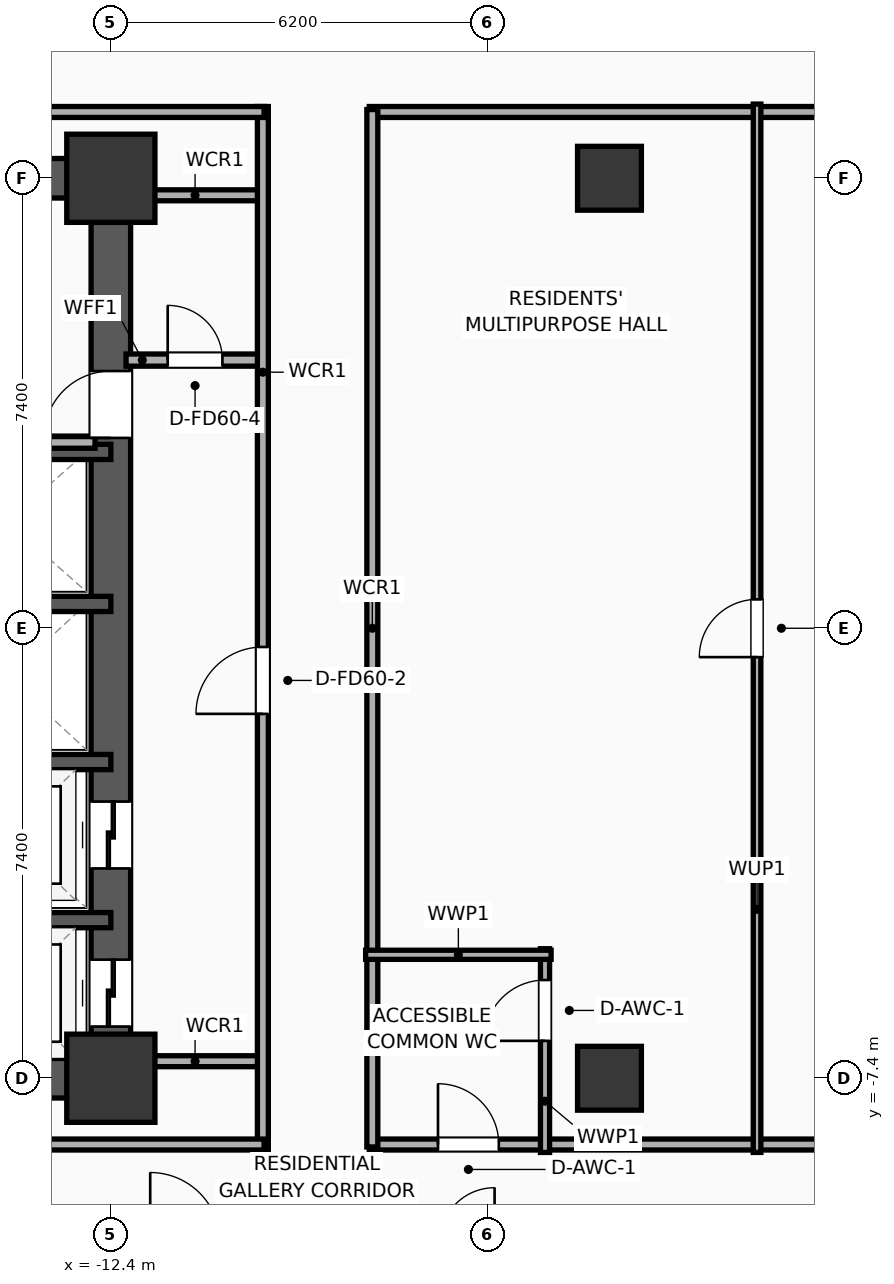
"""IFC4 building model, lengths in metres.
Left out: names, types, materials, properties, quantities, classifications, styles, units other than length and angle.
Written with IfcOpenShell. Run it as: python <this file> out.ifc"""

import sys

from ifc_helpers import new_model, si_unit, direction, frame, frame_2d, origin, origin_2d, place, context, subcontext, project, spatial, rectangle, extrude, element, fill, save


model = new_model("IFC4")
c1 = context("Model", 3, precision=1e-05, world=origin(), true_north=direction((0.0, 1.0)))
c2 = subcontext(c1, "Body", "Model", "MODEL_VIEW")
j1 = project(units=[si_unit("LENGTHUNIT", "METRE"), si_unit("PLANEANGLEUNIT", "RADIAN")], contexts=[c1])
p1 = place(None, origin())
s1 = spatial("IfcSite", under=j1, at=p1, CompositionType="ELEMENT")
p2 = place(p1, origin())
s2 = spatial("IfcBuilding", under=s1, at=p2, CompositionType="ELEMENT")
p3 = place(p2, frame((0.0, 0.0, 33.8)))
s3 = spatial("IfcBuildingStorey", under=s2, at=p3, CompositionType="ELEMENT", Elevation=33.8)
for number, where, z_axis, x_axis in (
    (1, (-12.4, -7.4, 0.0), (0.0, 0.0, 1.0), (1.0, 0.0, 0.0)),
    (2, (-12.4, 7.4, 0.0), (0.0, 0.0, 1.0), (1.0, 0.0, 0.0)),
):
    element("IfcColumn", number, at=place(p3, frame(where, z_axis=z_axis, x_axis=x_axis)), inside=s3, PredefinedType="COLUMN", context=c2, shape_type="SweptSolid", body=[
        extrude(rectangle(XDim=1.45, YDim=1.45, at=origin_2d()), origin(), (0.0, 0.0, 1.0), 3.9),
    ])
for number, where, z_axis, x_axis in (
    (3, (-19.525, -7.4, 0.0), (0.0, 0.0, 1.0), (1.0, 0.0, 0.0)),
    (4, (-19.525, 7.4, 0.0), (0.0, 0.0, 1.0), (1.0, 0.0, 0.0)),
):
    element("IfcWall", number, at=place(p3, frame(where, z_axis=z_axis, x_axis=x_axis)), inside=s3, PredefinedType="SHEAR", context=c2, shape_type="SweptSolid", body=[
        extrude(rectangle(XDim=7.45, YDim=0.65, at=frame_2d((3.725, 0.0))), origin(), (0.0, 0.0, 1.0), 3.65),
    ])
p4 = place(p3, frame((-12.4, -7.4, 0.0), z_axis=(0.0, 0.0, 1.0), x_axis=(0.0, 1.0, 0.0)))
e5 = element("IfcWall", 5, at=p4, inside=s3, PredefinedType="SHEAR", context=c2, shape_type="SweptSolid", body=[
    extrude(rectangle(XDim=14.8, YDim=0.65, at=frame_2d((7.4, 0.0))), origin(), (0.0, 0.0, 1.0), 3.65),
])
p5 = place(p4, frame((0.85, 0.0, 0.0)))
e6 = element("IfcOpeningElement", 6, at=p5, cuts=e5, PredefinedType="OPENING", context=c2, shape_type="SweptSolid", body=[
    extrude(rectangle(XDim=1.1, YDim=2.05, at=frame_2d((0.55, 1.025))), frame((0.0, 0.335, 0.0), z_axis=(0.0, -1.0, 0.0), x_axis=(1.0, 0.0, 0.0)), (0.0, 0.0, 1.0), 0.67),
])
p6 = place(p4, frame((3.45, 0.0, 0.0)))
e7 = element("IfcOpeningElement", 7, at=p6, cuts=e5, PredefinedType="OPENING", context=c2, shape_type="SweptSolid", body=[
    extrude(rectangle(XDim=1.1, YDim=2.05, at=frame_2d((0.55, 1.025))), frame((0.0, 0.335, 0.0), z_axis=(0.0, -1.0, 0.0), x_axis=(1.0, 0.0, 0.0)), (0.0, 0.0, 1.0), 0.67),
])
p7 = place(p4, frame((10.53, 0.0, 0.0)))
e8 = element("IfcOpeningElement", 8, at=p7, cuts=e5, PredefinedType="OPENING", context=c2, shape_type="SweptSolid", body=[
    extrude(rectangle(XDim=1.1, YDim=2.05, at=frame_2d((0.55, 1.025))), frame((0.0, 0.335, 0.0), z_axis=(0.0, -1.0, 0.0), x_axis=(1.0, 0.0, 0.0)), (0.0, 0.0, 1.0), 0.67),
])
for number, where, z_axis, x_axis in (
    (9, (-4.2, -7.4, 0.0), (0.0, 0.0, 1.0), (1.0, 0.0, 0.0)),
    (10, (-4.2, 7.4, 0.0), (0.0, 0.0, 1.0), (1.0, 0.0, 0.0)),
):
    element("IfcColumn", number, at=place(p3, frame(where, z_axis=z_axis, x_axis=x_axis)), inside=s3, PredefinedType="COLUMN", context=c2, shape_type="SweptSolid", body=[
        extrude(rectangle(XDim=1.05, YDim=1.05, at=origin_2d()), origin(), (0.0, 0.0, 1.0), 3.9),
    ])
for number, where, z_axis, x_axis in (
    (11, (-12.4, -4.8, 0.0), (0.0, 0.0, 1.0), (-1.0, 0.0, 0.0)),
    (12, (-12.4, -2.2, 0.0), (0.0, 0.0, 1.0), (-1.0, 0.0, 0.0)),
    (13, (-12.4, 0.4, 0.0), (0.0, 0.0, 1.0), (-1.0, 0.0, 0.0)),
    (14, (-12.4, 2.9, 0.0), (0.0, 0.0, 1.0), (-1.0, 0.0, 0.0)),
):
    element("IfcWall", number, at=place(p3, frame(where, z_axis=z_axis, x_axis=x_axis)), inside=s3, PredefinedType="SOLIDWALL", context=c2, shape_type="SweptSolid", body=[
        extrude(rectangle(XDim=3.0, YDim=0.25, at=frame_2d((1.5, 0.0))), origin(), (0.0, 0.0, 1.0), 3.65),
    ])
p8 = place(p3, frame((-15.82, 3.06, 0.0), z_axis=(0.0, 0.0, 1.0), x_axis=(1.0, 0.0, 0.0)))
e15 = element("IfcWall", 15, at=p8, inside=s3, PredefinedType="PARTITIONING", context=c2, shape_type="SweptSolid", body=[
    extrude(rectangle(XDim=3.16, YDim=0.2, at=frame_2d((1.58, 0.0))), origin(), (0.0, 0.0, 1.0), 3.65),
])
p9 = place(p3, frame((-12.15, 4.41, 0.0), z_axis=(0.0, 0.0, 1.0), x_axis=(1.0, 0.0, 0.0)))
e16 = element("IfcWall", 16, at=p9, inside=s3, PredefinedType="PARTITIONING", context=c2, shape_type="SweptSolid", body=[
    extrude(rectangle(XDim=2.27, YDim=0.2, at=frame_2d((1.135, 0.0))), origin(), (0.0, 0.0, 1.0), 3.65),
])
p10 = place(p9, frame((0.685, 0.0, 0.0)))
e17 = element("IfcOpeningElement", 17, at=p10, cuts=e16, PredefinedType="OPENING", context=c2, shape_type="SweptSolid", body=[
    extrude(rectangle(XDim=0.9, YDim=2.05, at=frame_2d((0.45, 1.025))), frame((0.0, 0.11, 0.0), z_axis=(0.0, -1.0, 0.0), x_axis=(1.0, 0.0, 0.0)), (0.0, 0.0, 1.0), 0.22),
])
for number, where, z_axis, x_axis in (
    (18, (-12.15, 7.12, 0.0), (0.0, 0.0, 1.0), (1.0, 0.0, 0.0)),
    (19, (-12.15, -7.12, 0.0), (0.0, 0.0, 1.0), (1.0, 0.0, 0.0)),
):
    element("IfcWall", number, at=place(p3, frame(where, z_axis=z_axis, x_axis=x_axis)), inside=s3, PredefinedType="PARTITIONING", context=c2, shape_type="SweptSolid", body=[
        extrude(rectangle(XDim=2.27, YDim=0.18, at=frame_2d((1.135, 0.0))), origin(), (0.0, 0.0, 1.0), 2.94),
    ])
p11 = place(p3, frame((-9.9, -8.58, 0.0), z_axis=(0.0, 0.0, 1.0), x_axis=(0.0, 1.0, 0.0)))
e20 = element("IfcWall", 20, at=p11, inside=s3, PredefinedType="PARTITIONING", context=c2, shape_type="SweptSolid", body=[
    extrude(rectangle(XDim=17.16, YDim=0.18, at=frame_2d((8.58, 0.0))), origin(), (0.0, 0.0, 1.0), 3.65),
])
p12 = place(p11, frame((7.172, 0.0, 0.0)))
e21 = element("IfcOpeningElement", 21, at=p12, cuts=e20, PredefinedType="OPENING", context=c2, shape_type="SweptSolid", body=[
    extrude(rectangle(XDim=1.1, YDim=2.05, at=frame_2d((0.55, 1.025))), frame((0.0, 0.1, 0.0), z_axis=(0.0, -1.0, 0.0), x_axis=(1.0, 0.0, 0.0)), (0.0, 0.0, 1.0), 0.2),
])
p13 = place(p3, frame((-33.41, 8.49, 0.0), z_axis=(0.0, 0.0, 1.0), x_axis=(1.0, 0.0, 0.0)))
e22 = element("IfcWall", 22, at=p13, inside=s3, PredefinedType="PARTITIONING", context=c2, shape_type="SweptSolid", body=[
    extrude(rectangle(XDim=23.53, YDim=0.18, at=frame_2d((11.765, 0.0))), origin(), (0.0, 0.0, 1.0), 3.65),
])
p14 = place(p13, frame((4.54, 0.0, 0.0)))
e23 = element("IfcOpeningElement", 23, at=p14, cuts=e22, PredefinedType="OPENING", context=c2, shape_type="SweptSolid", body=[
    extrude(rectangle(XDim=1.15, YDim=2.05, at=frame_2d((0.575, 1.025))), frame((0.0, 0.1, 0.0), z_axis=(0.0, -1.0, 0.0), x_axis=(1.0, 0.0, 0.0)), (0.0, 0.0, 1.0), 0.2),
])
p15 = place(p3, frame((-33.41, -8.49, 0.0), z_axis=(0.0, 0.0, 1.0), x_axis=(1.0, 0.0, 0.0)))
e24 = element("IfcWall", 24, at=p15, inside=s3, PredefinedType="PARTITIONING", context=c2, shape_type="SweptSolid", body=[
    extrude(rectangle(XDim=23.53, YDim=0.18, at=frame_2d((11.765, 0.0))), origin(), (0.0, 0.0, 1.0), 3.65),
])
p16 = place(p3, frame((-8.15, 8.49, 0.0), z_axis=(0.0, 0.0, 1.0), x_axis=(1.0, 0.0, 0.0)))
e25 = element("IfcWall", 25, at=p16, inside=s3, PredefinedType="PARTITIONING", context=c2, shape_type="SweptSolid", body=[
    extrude(rectangle(XDim=16.3, YDim=0.18, at=frame_2d((8.15, 0.0))), origin(), (0.0, 0.0, 1.0), 3.65),
])
p17 = place(p16, frame((8.49, 0.0, 0.0)))
e26 = element("IfcOpeningElement", 26, at=p17, cuts=e25, PredefinedType="OPENING", context=c2, shape_type="SweptSolid", body=[
    extrude(rectangle(XDim=0.95, YDim=2.05, at=frame_2d((0.475, 1.025))), frame((0.0, 0.1, 0.0), z_axis=(0.0, -1.0, 0.0), x_axis=(1.0, 0.0, 0.0)), (0.0, 0.0, 1.0), 0.2),
])
p18 = place(p3, frame((-8.15, -8.49, 0.0), z_axis=(0.0, 0.0, 1.0), x_axis=(1.0, 0.0, 0.0)))
e27 = element("IfcWall", 27, at=p18, inside=s3, PredefinedType="PARTITIONING", context=c2, shape_type="SweptSolid", body=[
    extrude(rectangle(XDim=16.3, YDim=0.18, at=frame_2d((8.15, 0.0))), origin(), (0.0, 0.0, 1.0), 3.65),
])
p19 = place(p18, frame((1.13, 0.0, 0.0)))
e28 = element("IfcOpeningElement", 28, at=p19, cuts=e27, PredefinedType="OPENING", context=c2, shape_type="SweptSolid", body=[
    extrude(rectangle(XDim=1.0, YDim=2.05, at=frame_2d((0.5, 1.025))), frame((0.0, 0.1, 0.0), z_axis=(0.0, -1.0, 0.0), x_axis=(1.0, 0.0, 0.0)), (0.0, 0.0, 1.0), 0.2),
])
p20 = place(p18, frame((10.12, 0.0, 0.0)))
e29 = element("IfcOpeningElement", 29, at=p20, cuts=e27, PredefinedType="OPENING", context=c2, shape_type="SweptSolid", body=[
    extrude(rectangle(XDim=0.95, YDim=2.05, at=frame_2d((0.475, 1.025))), frame((0.0, 0.1, 0.0), z_axis=(0.0, -1.0, 0.0), x_axis=(1.0, 0.0, 0.0)), (0.0, 0.0, 1.0), 0.2),
])
p21 = place(p3, frame((-8.1, -8.53, 0.0), z_axis=(0.0, 0.0, 1.0), x_axis=(0.0, 1.0, 0.0)))
e30 = element("IfcWall", 30, at=p21, inside=s3, PredefinedType="PARTITIONING", context=c2, shape_type="SweptSolid", body=[
    extrude(rectangle(XDim=17.06, YDim=0.18, at=frame_2d((8.53, 0.0))), origin(), (0.0, 0.0, 1.0), 3.65),
])
p22 = place(p3, frame((-5.26, -8.62, 0.0), z_axis=(0.0, 0.0, 1.0), x_axis=(0.0, 1.0, 0.0)))
e31 = element("IfcWall", 31, at=p22, inside=s3, PredefinedType="PLUMBINGWALL", context=c2, shape_type="SweptSolid", body=[
    extrude(rectangle(XDim=3.35, YDim=0.15, at=frame_2d((1.675, 0.0))), origin(), (0.0, 0.0, 1.0), 3.65),
])
p23 = place(p22, frame((1.835, 0.0, 0.0)))
e32 = element("IfcOpeningElement", 32, at=p23, cuts=e31, PredefinedType="OPENING", context=c2, shape_type="SweptSolid", body=[
    extrude(rectangle(XDim=1.0, YDim=2.05, at=frame_2d((0.5, 1.025))), frame((0.0, 0.085, 0.0), z_axis=(0.0, -1.0, 0.0), x_axis=(1.0, 0.0, 0.0)), (0.0, 0.0, 1.0), 0.17),
])
p24 = place(p3, frame((-8.21, -5.37, 0.0), z_axis=(0.0, 0.0, 1.0), x_axis=(1.0, 0.0, 0.0)))
e33 = element("IfcWall", 33, at=p24, inside=s3, PredefinedType="PLUMBINGWALL", context=c2, shape_type="SweptSolid", body=[
    extrude(rectangle(XDim=3.05, YDim=0.15, at=frame_2d((1.525, 0.0))), origin(), (0.0, 0.0, 1.0), 3.65),
])
p25 = place(p3, frame((-1.773, -8.62, 0.0), z_axis=(0.0, 0.0, 1.0), x_axis=(0.0, 1.0, 0.0)))
e34 = element("IfcWall", 34, at=p25, inside=s3, PredefinedType="PARTITIONING", context=c2, shape_type="SweptSolid", body=[
    extrude(rectangle(XDim=17.24, YDim=0.125, at=frame_2d((8.62, 0.0))), origin(), (0.0, 0.0, 1.0), 3.65),
])
p26 = place(p25, frame((8.145, 0.0, 0.0)))
e35 = element("IfcOpeningElement", 35, at=p26, cuts=e34, PredefinedType="OPENING", context=c2, shape_type="SweptSolid", body=[
    extrude(rectangle(XDim=0.95, YDim=2.05, at=frame_2d((0.475, 1.025))), frame((0.0, 0.073, 0.0), z_axis=(0.0, -1.0, 0.0), x_axis=(1.0, 0.0, 0.0)), (0.0, 0.0, 1.0), 0.145),
])
p27 = place(p5, origin())
e36 = element("IfcDoor", 36, at=p27, inside=s3, OperationType="SLIDING_TO_LEFT", PredefinedType="DOOR", context=c2, shape_type="SweptSolid", body=[
    extrude(rectangle(XDim=1.1, YDim=2.05, at=frame_2d((0.55, 1.025))), frame((0.0, 0.025, 0.0), z_axis=(0.0, -1.0, 0.0), x_axis=(1.0, 0.0, 0.0)), (0.0, 0.0, 1.0), 0.05),
])
fill(e6, e36)
p28 = place(p6, origin())
e37 = element("IfcDoor", 37, at=p28, inside=s3, OperationType="SLIDING_TO_LEFT", PredefinedType="DOOR", context=c2, shape_type="SweptSolid", body=[
    extrude(rectangle(XDim=1.1, YDim=2.05, at=frame_2d((0.55, 1.025))), frame((0.0, 0.025, 0.0), z_axis=(0.0, -1.0, 0.0), x_axis=(1.0, 0.0, 0.0)), (0.0, 0.0, 1.0), 0.05),
])
fill(e7, e37)
p29 = place(p10, origin())
e38 = element("IfcDoor", 38, at=p29, inside=s3, OperationType="SINGLE_SWING_LEFT", PredefinedType="DOOR", context=c2, shape_type="SweptSolid", body=[
    extrude(rectangle(XDim=0.9, YDim=2.05, at=frame_2d((0.45, 1.025))), frame((0.0, 0.025, 0.0), z_axis=(0.0, -1.0, 0.0), x_axis=(1.0, 0.0, 0.0)), (0.0, 0.0, 1.0), 0.05),
])
fill(e17, e38)
p30 = place(p12, origin())
e39 = element("IfcDoor", 39, at=p30, inside=s3, OperationType="SINGLE_SWING_LEFT", PredefinedType="DOOR", context=c2, shape_type="SweptSolid", body=[
    extrude(rectangle(XDim=1.1, YDim=2.05, at=frame_2d((0.55, 1.025))), frame((0.0, 0.025, 0.0), z_axis=(0.0, -1.0, 0.0), x_axis=(1.0, 0.0, 0.0)), (0.0, 0.0, 1.0), 0.05),
])
fill(e21, e39)
p31 = place(p19, origin())
e40 = element("IfcDoor", 40, at=p31, inside=s3, OperationType="SINGLE_SWING_LEFT", PredefinedType="DOOR", context=c2, shape_type="SweptSolid", body=[
    extrude(rectangle(XDim=1.0, YDim=2.05, at=frame_2d((0.5, 1.025))), frame((0.0, 0.025, 0.0), z_axis=(0.0, -1.0, 0.0), x_axis=(1.0, 0.0, 0.0)), (0.0, 0.0, 1.0), 0.05),
])
fill(e28, e40)
p32 = place(p23, origin())
e41 = element("IfcDoor", 41, at=p32, inside=s3, OperationType="SINGLE_SWING_LEFT", PredefinedType="DOOR", context=c2, shape_type="SweptSolid", body=[
    extrude(rectangle(XDim=1.0, YDim=2.05, at=frame_2d((0.5, 1.025))), frame((0.0, 0.025, 0.0), z_axis=(0.0, -1.0, 0.0), x_axis=(1.0, 0.0, 0.0)), (0.0, 0.0, 1.0), 0.05),
])
fill(e32, e41)
p33 = place(p26, origin())
e42 = element("IfcDoor", 42, at=p33, inside=s3, OperationType="SINGLE_SWING_LEFT", PredefinedType="DOOR", context=c2, shape_type="SweptSolid", body=[
    extrude(rectangle(XDim=0.95, YDim=2.05, at=frame_2d((0.475, 1.025))), frame((0.0, 0.025, 0.0), z_axis=(0.0, -1.0, 0.0), x_axis=(1.0, 0.0, 0.0)), (0.0, 0.0, 1.0), 0.05),
])
fill(e35, e42)
p34 = place(p7, origin())
e43 = element("IfcDoor", 43, at=p34, inside=s3, OperationType="SINGLE_SWING_LEFT", PredefinedType="DOOR", context=c2, shape_type="SweptSolid", body=[
    extrude(rectangle(XDim=1.1, YDim=2.05, at=frame_2d((0.55, 1.025))), frame((0.0, 0.025, 0.0), z_axis=(0.0, -1.0, 0.0), x_axis=(1.0, 0.0, 0.0)), (0.0, 0.0, 1.0), 0.05),
])
fill(e8, e43)
save(model, sys.argv[1])
